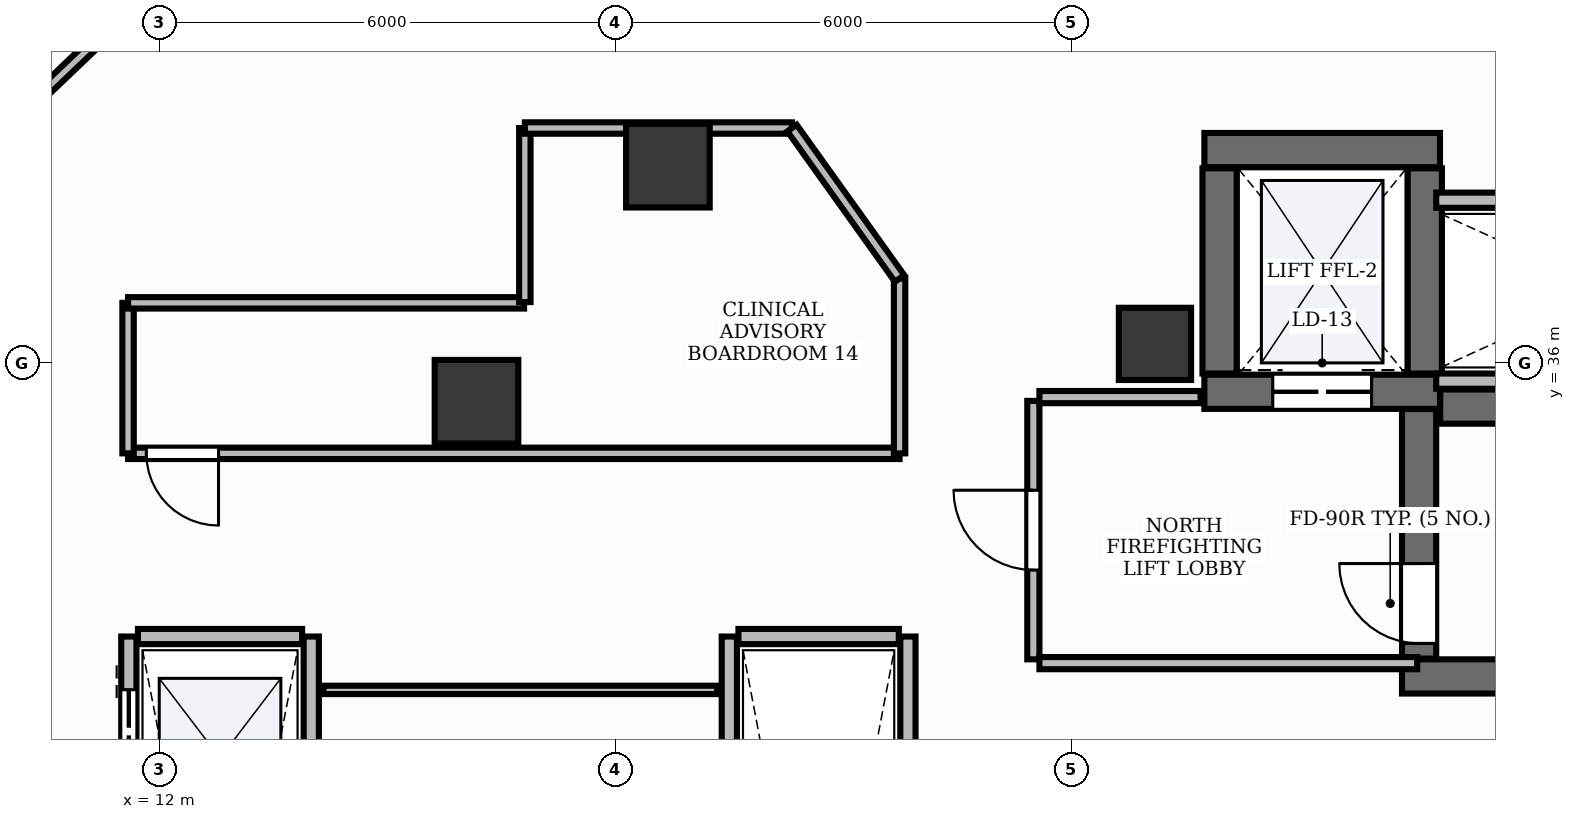
"""IFC4 building model, lengths in metres.
Left out: names, types, materials, properties, quantities, classifications, styles, units other than length and angle.
Written with IfcOpenShell. Run it as: python <this file> out.ifc"""

import sys

from ifc_helpers import new_model, si_unit, direction, frame, frame_2d, origin, origin_2d, place, context, subcontext, project, spatial, rectangle, extrude, element, fill, save


model = new_model("IFC4")
c1 = context("Model", 3, precision=1e-05, world=origin(), true_north=direction((0.0, 1.0)))
c2 = subcontext(c1, "Body", "Model", "MODEL_VIEW")
j1 = project(units=[si_unit("LENGTHUNIT", "METRE"), si_unit("PLANEANGLEUNIT", "RADIAN")], contexts=[c1])
p1 = place(None, origin())
s1 = spatial("IfcSite", under=j1, at=p1, CompositionType="ELEMENT")
p2 = place(p1, origin())
s2 = spatial("IfcBuilding", under=s1, at=p2, CompositionType="ELEMENT")
p3 = place(p2, frame((0.0, 0.0, 42.6)))
s3 = spatial("IfcBuildingStorey", under=s2, at=p3, CompositionType="ELEMENT", Elevation=42.6)
p4 = place(p3, frame((28.852, 35.425, 0.0), z_axis=(0.0, 0.0, 1.0), x_axis=(1.0, 0.0, 0.0)))
e1 = element("IfcWall", 1, at=p4, inside=s3, PredefinedType="SHEAR", context=c2, shape_type="SweptSolid", body=[
    extrude(rectangle(XDim=8.248, YDim=0.45, at=frame_2d((4.124, 0.0))), origin(), (0.0, 0.0, 1.0), 3.9),
])
p5 = place(p3, frame((28.35, 31.875, 0.0), z_axis=(0.0, 0.0, 1.0), x_axis=(1.0, 0.0, 0.0)))
e2 = element("IfcWall", 2, at=p5, inside=s3, PredefinedType="SHEAR", context=c2, shape_type="SweptSolid", body=[
    extrude(rectangle(XDim=8.75, YDim=0.45, at=frame_2d((4.375, 0.0))), origin(), (0.0, 0.0, 1.0), 3.9),
])
p6 = place(p3, frame((28.575, 32.11, 0.0), z_axis=(0.0, 0.0, 1.0), x_axis=(0.0, 1.0, 0.0)))
e3 = element("IfcWall", 3, at=p6, inside=s3, PredefinedType="SHEAR", context=c2, shape_type="SweptSolid", body=[
    extrude(rectangle(XDim=3.283, YDim=0.45, at=frame_2d((1.642, 0.0))), origin(), (0.0, 0.0, 1.0), 3.9),
])
p7 = place(p6, frame((0.2, 0.0, 0.0)))
e4 = element("IfcOpeningElement", 4, at=p7, cuts=e3, PredefinedType="OPENING", context=c2, shape_type="SweptSolid", body=[
    extrude(rectangle(XDim=1.05, YDim=2.15, at=frame_2d((0.525, 1.075))), frame((0.0, 0.24, 0.0), z_axis=(0.0, -1.0, 0.0), x_axis=(1.0, 0.0, 0.0)), (0.0, 0.0, 1.0), 0.48),
])
p8 = place(p3, frame((25.75, 38.8, 0.0), z_axis=(0.0, 0.0, 1.0), x_axis=(1.0, 0.0, 0.0)))
e5 = element("IfcWall", 5, at=p8, inside=s3, PredefinedType="SHEAR", context=c2, shape_type="SweptSolid", body=[
    extrude(rectangle(XDim=3.1, YDim=0.45, at=frame_2d((1.55, 0.0))), origin(), (0.0, 0.0, 1.0), 3.9),
])
p9 = place(p3, frame((25.75, 35.62, 0.0), z_axis=(0.0, 0.0, 1.0), x_axis=(1.0, 0.0, 0.0)))
e6 = element("IfcWall", 6, at=p9, inside=s3, PredefinedType="SHEAR", context=c2, shape_type="SweptSolid", body=[
    extrude(rectangle(XDim=3.1, YDim=0.45, at=frame_2d((1.55, 0.0))), origin(), (0.0, 0.0, 1.0), 3.9),
])
p10 = place(p9, frame((0.9, 0.0, 0.0)))
e7 = element("IfcOpeningElement", 7, at=p10, cuts=e6, PredefinedType="OPENING", context=c2, shape_type="SweptSolid", body=[
    extrude(rectangle(XDim=1.3, YDim=2.2, at=frame_2d((0.65, 1.1))), frame((0.0, 0.24, 0.0), z_axis=(0.0, -1.0, 0.0), x_axis=(1.0, 0.0, 0.0)), (0.0, 0.0, 1.0), 0.48),
])
for number, where, z_axis, x_axis in (
    (8, (25.95, 35.86, 0.0), (0.0, 0.0, 1.0), (0.0, 1.0, 0.0)),
    (9, (28.65, 35.86, 0.0), (0.0, 0.0, 1.0), (0.0, 1.0, 0.0)),
):
    element("IfcWall", number, at=place(p3, frame(where, z_axis=z_axis, x_axis=x_axis)), inside=s3, PredefinedType="SHEAR", context=c2, shape_type="SweptSolid", body=[
        extrude(rectangle(XDim=2.7, YDim=0.45, at=frame_2d((1.35, 0.0))), origin(), (0.0, 0.0, 1.0), 3.9),
    ])
p11 = place(p3, frame((25.1, 36.25, -0.0), z_axis=(0.0, 0.0, 1.0), x_axis=(1.0, 0.0, 0.0)))
e10 = element("IfcColumn", 10, at=p11, inside=s3, PredefinedType="PILASTER", context=c2, shape_type="SweptSolid", body=[
    extrude(rectangle(XDim=0.95, YDim=0.95, at=origin_2d()), origin(), (0.0, 0.0, 1.0), 3.901),
])
for number, where, z_axis, x_axis in (
    (11, (18.692, 38.595, -0.0), (0.0, 0.0, 1.0), (1.0, 0.0, 0.0)),
    (12, (16.174, 35.489, -0.0), (0.0, 0.0, 1.0), (1.0, 0.0, 0.0)),
):
    element("IfcColumn", number, at=place(p3, frame(where, z_axis=z_axis, x_axis=x_axis)), inside=s3, PredefinedType="COLUMN", context=c2, shape_type="SweptSolid", body=[
        extrude(rectangle(XDim=1.1, YDim=1.1, at=origin_2d()), origin(), (0.0, 0.0, 1.0), 3.901),
    ])
p12 = place(p3, frame((11.6, 21.6, 0.0), z_axis=(0.0, 0.0, 1.0), x_axis=(0.0, 1.0, 0.0)))
e13 = element("IfcWall", 13, at=p12, inside=s3, PredefinedType="PARTITIONING", context=c2, shape_type="SweptSolid", body=[
    extrude(rectangle(XDim=10.8, YDim=0.2, at=frame_2d((5.4, 0.0))), origin(), (0.0, 0.0, 1.0), 2.91),
])
p13 = place(p12, frame((0.9, 0.0, 0.0)))
e14 = element("IfcOpeningElement", 14, at=p13, cuts=e13, PredefinedType="OPENING", context=c2, shape_type="SweptSolid", body=[
    extrude(rectangle(XDim=1.1, YDim=2.2, at=frame_2d((0.55, 1.1))), frame((0.0, 0.115, 0.0), z_axis=(0.0, -1.0, 0.0), x_axis=(1.0, 0.0, 0.0)), (0.0, 0.0, 1.0), 0.23),
])
p14 = place(p12, frame((3.6, 0.0, 0.0)))
e15 = element("IfcOpeningElement", 15, at=p14, cuts=e13, PredefinedType="OPENING", context=c2, shape_type="SweptSolid", body=[
    extrude(rectangle(XDim=1.1, YDim=2.2, at=frame_2d((0.55, 1.1))), frame((0.0, 0.115, 0.0), z_axis=(0.0, -1.0, 0.0), x_axis=(1.0, 0.0, 0.0)), (0.0, 0.0, 1.0), 0.23),
])
p15 = place(p12, frame((6.3, 0.0, 0.0)))
e16 = element("IfcOpeningElement", 16, at=p15, cuts=e13, PredefinedType="OPENING", context=c2, shape_type="SweptSolid", body=[
    extrude(rectangle(XDim=1.1, YDim=2.2, at=frame_2d((0.55, 1.1))), frame((0.0, 0.115, 0.0), z_axis=(0.0, -1.0, 0.0), x_axis=(1.0, 0.0, 0.0)), (0.0, 0.0, 1.0), 0.23),
])
p16 = place(p12, frame((9.0, 0.0, 0.0)))
e17 = element("IfcOpeningElement", 17, at=p16, cuts=e13, PredefinedType="OPENING", context=c2, shape_type="SweptSolid", body=[
    extrude(rectangle(XDim=1.1, YDim=2.2, at=frame_2d((0.55, 1.1))), frame((0.0, 0.115, 0.0), z_axis=(0.0, -1.0, 0.0), x_axis=(1.0, 0.0, 0.0)), (0.0, 0.0, 1.0), 0.23),
])
p17 = place(p3, frame((14.0, 21.6, 0.0), z_axis=(0.0, 0.0, 1.0), x_axis=(0.0, 1.0, 0.0)))
e18 = element("IfcWall", 18, at=p17, inside=s3, PredefinedType="PARTITIONING", context=c2, shape_type="SweptSolid", body=[
    extrude(rectangle(XDim=10.8, YDim=0.2, at=frame_2d((5.4, 0.0))), origin(), (0.0, 0.0, 1.0), 2.91),
])
p18 = place(p3, frame((11.72, 32.4, 0.0), z_axis=(0.0, 0.0, 1.0), x_axis=(1.0, 0.0, 0.0)))
e19 = element("IfcWall", 19, at=p18, inside=s3, PredefinedType="PARTITIONING", context=c2, shape_type="SweptSolid", body=[
    extrude(rectangle(XDim=2.16, YDim=0.2, at=frame_2d((1.08, 0.0))), origin(), (0.0, 0.0, 1.0), 2.91),
])
for number, where, z_axis, x_axis in (
    (20, (19.5, 21.6, 0.0), (0.0, 0.0, 1.0), (0.0, 1.0, 0.0)),
    (21, (21.85, 21.6, 0.0), (0.0, 0.0, 1.0), (0.0, 1.0, 0.0)),
):
    element("IfcWall", number, at=place(p3, frame(where, z_axis=z_axis, x_axis=x_axis)), inside=s3, PredefinedType="PARTITIONING", context=c2, shape_type="SweptSolid", body=[
        extrude(rectangle(XDim=10.8, YDim=0.2, at=frame_2d((5.4, 0.0))), origin(), (0.0, 0.0, 1.0), 2.91),
    ])
p19 = place(p3, frame((19.62, 32.4, 0.0), z_axis=(0.0, 0.0, 1.0), x_axis=(1.0, 0.0, 0.0)))
e22 = element("IfcWall", 22, at=p19, inside=s3, PredefinedType="PARTITIONING", context=c2, shape_type="SweptSolid", body=[
    extrude(rectangle(XDim=2.11, YDim=0.2, at=frame_2d((1.055, 0.0))), origin(), (0.0, 0.0, 1.0), 2.91),
])
for number, where, z_axis, x_axis in (
    (23, (28.8, 35.76, 0.0), (0.0, 0.0, 1.0), (1.0, 0.0, 0.0)),
    (24, (28.8, 38.14, 0.0), (0.0, 0.0, 1.0), (1.0, 0.0, 0.0)),
):
    element("IfcWall", number, at=place(p3, frame(where, z_axis=z_axis, x_axis=x_axis)), inside=s3, PredefinedType="PARTITIONING", context=c2, shape_type="SweptSolid", body=[
        extrude(rectangle(XDim=4.57, YDim=0.2, at=frame_2d((2.285, 0.0))), origin(), (0.0, 0.0, 1.0), 2.91),
    ])
p20 = place(p3, frame((23.5, 32.1, 0.0), z_axis=(0.0, 0.0, 1.0), x_axis=(0.0, 1.0, 0.0)))
e25 = element("IfcWall", 25, at=p20, inside=s3, PredefinedType="PARTITIONING", context=c2, shape_type="SweptSolid", body=[
    extrude(rectangle(XDim=3.4, YDim=0.16, at=frame_2d((1.7, 0.0))), origin(), (0.0, 0.0, 1.0), 2.91),
])
p21 = place(p20, frame((1.175, 0.0, 0.0)))
e26 = element("IfcOpeningElement", 26, at=p21, cuts=e25, PredefinedType="OPENING", context=c2, shape_type="SweptSolid", body=[
    extrude(rectangle(XDim=1.05, YDim=2.15, at=frame_2d((0.525, 1.075))), frame((0.0, 0.095, 0.0), z_axis=(0.0, -1.0, 0.0), x_axis=(1.0, 0.0, 0.0)), (0.0, 0.0, 1.0), 0.19),
])
p22 = place(p3, frame((23.58, 32.05, 0.0), z_axis=(0.0, 0.0, 1.0), x_axis=(1.0, 0.0, 0.0)))
e27 = element("IfcWall", 27, at=p22, inside=s3, PredefinedType="PARTITIONING", context=c2, shape_type="SweptSolid", body=[
    extrude(rectangle(XDim=4.97, YDim=0.16, at=frame_2d((2.485, 0.0))), origin(), (0.0, 0.0, 1.0), 2.91),
])
p23 = place(p3, frame((23.58, 35.55, 0.0), z_axis=(0.0, 0.0, 1.0), x_axis=(1.0, 0.0, 0.0)))
e28 = element("IfcWall", 28, at=p23, inside=s3, PredefinedType="PARTITIONING", context=c2, shape_type="SweptSolid", body=[
    extrude(rectangle(XDim=2.12, YDim=0.16, at=frame_2d((1.06, 0.0))), origin(), (0.0, 0.0, 1.0), 2.91),
])
p24 = place(p3, frame((21.74, 34.81, 0.0), z_axis=(0.0, 0.0, 1.0), x_axis=(-1.0, 0.0, 0.0)))
e29 = element("IfcWall", 29, at=p24, inside=s3, PredefinedType="PARTITIONING", context=c2, shape_type="SweptSolid", body=[
    extrude(rectangle(XDim=10.15, YDim=0.15, at=frame_2d((5.075, 0.0))), origin(), (0.0, 0.0, 1.0), 2.91),
])
p25 = place(p24, frame((8.96, 0.0, 0.0)))
e30 = element("IfcOpeningElement", 30, at=p25, cuts=e29, PredefinedType="OPENING", context=c2, shape_type="SweptSolid", body=[
    extrude(rectangle(XDim=0.95, YDim=2.15, at=frame_2d((0.475, 1.075))), frame((0.0, 0.09, 0.0), z_axis=(0.0, -1.0, 0.0), x_axis=(1.0, 0.0, 0.0)), (0.0, 0.0, 1.0), 0.18),
])
p26 = place(p3, frame((14.16, 31.698, 0.0), z_axis=(0.0, 0.0, 1.0), x_axis=(1.0, 0.0, 0.0)))
e31 = element("IfcWall", 31, at=p26, inside=s3, PredefinedType="MOVABLE", context=c2, shape_type="SweptSolid", body=[
    extrude(rectangle(XDim=5.18, YDim=0.11, at=frame_2d((2.59, 0.0))), origin(), (0.0, 0.0, 1.0), 2.91),
])
p27 = place(p3, frame((21.74, 37.111, 0.0), z_axis=(0.0, 0.0, 1.0), x_axis=(0.0, -1.0, 0.0)))
e32 = element("IfcWall", 32, at=p27, inside=s3, PredefinedType="PARTITIONING", context=c2, shape_type="SweptSolid", body=[
    extrude(rectangle(XDim=2.301, YDim=0.15, at=frame_2d((1.15, 0.0))), origin(), (0.0, 0.0, 1.0), 2.91),
])
p28 = place(p3, frame((11.59, 34.81, 0.0), z_axis=(0.0, 0.0, 1.0), x_axis=(0.0, 1.0, 0.0)))
e33 = element("IfcWall", 33, at=p28, inside=s3, PredefinedType="PARTITIONING", context=c2, shape_type="SweptSolid", body=[
    extrude(rectangle(XDim=1.98, YDim=0.15, at=frame_2d((0.99, 0.0))), origin(), (0.0, 0.0, 1.0), 2.91),
])
p29 = place(p3, frame((11.59, 36.79, 0.0), z_axis=(0.0, 0.0, 1.0), x_axis=(1.0, 0.0, 0.0)))
e34 = element("IfcWall", 34, at=p29, inside=s3, PredefinedType="PARTITIONING", context=c2, shape_type="SweptSolid", body=[
    extrude(rectangle(XDim=5.21, YDim=0.15, at=frame_2d((2.605, 0.0))), origin(), (0.0, 0.0, 1.0), 2.91),
])
p30 = place(p3, frame((16.81, 36.8, 0.0), z_axis=(0.0, 0.0, 1.0), x_axis=(0.0, 1.0, 0.0)))
e35 = element("IfcWall", 35, at=p30, inside=s3, PredefinedType="PARTITIONING", context=c2, shape_type="SweptSolid", body=[
    extrude(rectangle(XDim=2.29, YDim=0.15, at=frame_2d((1.145, 0.0))), origin(), (0.0, 0.0, 1.0), 2.91),
])
p31 = place(p3, frame((16.81, 39.09, 0.0), z_axis=(0.0, 0.0, 1.0), x_axis=(1.0, 0.0, 0.0)))
e36 = element("IfcWall", 36, at=p31, inside=s3, PredefinedType="PARTITIONING", context=c2, shape_type="SweptSolid", body=[
    extrude(rectangle(XDim=3.515, YDim=0.15, at=frame_2d((1.757, 0.0))), origin(), (0.0, 0.0, 1.0), 2.91),
])
p32 = place(p3, frame((20.325, 39.09, 0.0), z_axis=(0.0, 0.0, 1.0), x_axis=(0.581703214005, -0.813401113115, 0.0)))
e37 = element("IfcWall", 37, at=p32, inside=s3, PredefinedType="PARTITIONING", context=c2, shape_type="SweptSolid", body=[
    extrude(rectangle(XDim=2.433, YDim=0.15, at=frame_2d((1.217, 0.0))), origin(), (0.0, 0.0, 1.0), 2.91),
])
p33 = place(p3, frame((11.307, 40.358, 0.0), z_axis=(0.0, 0.0, 1.0), x_axis=(-0.723655021688, -0.690161872017, 0.0)))
e38 = element("IfcWall", 38, at=p33, inside=s3, PredefinedType="PARTITIONING", context=c2, shape_type="SweptSolid", body=[
    extrude(rectangle(XDim=2.406, YDim=0.15, at=frame_2d((1.203, 0.0))), origin(), (0.0, 0.0, 1.0), 2.91),
])
p34 = place(p7, origin())
e39 = element("IfcDoor", 39, at=p34, inside=s3, OperationType="SINGLE_SWING_RIGHT", PredefinedType="DOOR", context=c2, shape_type="SweptSolid", body=[
    extrude(rectangle(XDim=1.05, YDim=2.15, at=frame_2d((0.525, 1.075))), frame((0.0, 0.025, 0.0), z_axis=(0.0, -1.0, 0.0), x_axis=(1.0, 0.0, 0.0)), (0.0, 0.0, 1.0), 0.05),
])
fill(e4, e39)
p35 = place(p16, origin())
e40 = element("IfcDoor", 40, at=p35, inside=s3, OperationType="DOUBLE_DOOR_SLIDING", PredefinedType="DOOR", context=c2, shape_type="SweptSolid", body=[
    extrude(rectangle(XDim=1.1, YDim=2.2, at=frame_2d((0.55, 1.1))), frame((0.0, 0.025, 0.0), z_axis=(0.0, -1.0, 0.0), x_axis=(1.0, 0.0, 0.0)), (0.0, 0.0, 1.0), 0.05),
])
fill(e17, e40)
p36 = place(p10, origin())
e41 = element("IfcDoor", 41, at=p36, inside=s3, OperationType="DOUBLE_DOOR_SLIDING", PredefinedType="DOOR", context=c2, shape_type="SweptSolid", body=[
    extrude(rectangle(XDim=1.3, YDim=2.2, at=frame_2d((0.65, 1.1))), frame((0.0, 0.025, 0.0), z_axis=(0.0, -1.0, 0.0), x_axis=(1.0, 0.0, 0.0)), (0.0, 0.0, 1.0), 0.05),
])
fill(e7, e41)
p37 = place(p21, origin())
e42 = element("IfcDoor", 42, at=p37, inside=s3, OperationType="SINGLE_SWING_RIGHT", PredefinedType="DOOR", context=c2, shape_type="SweptSolid", body=[
    extrude(rectangle(XDim=1.05, YDim=2.15, at=frame_2d((0.525, 1.075))), frame((0.0, 0.025, 0.0), z_axis=(0.0, -1.0, 0.0), x_axis=(1.0, 0.0, 0.0)), (0.0, 0.0, 1.0), 0.05),
])
fill(e26, e42)
p38 = place(p25, origin())
e43 = element("IfcDoor", 43, at=p38, inside=s3, OperationType="SINGLE_SWING_LEFT", PredefinedType="DOOR", context=c2, shape_type="SweptSolid", body=[
    extrude(rectangle(XDim=0.95, YDim=2.15, at=frame_2d((0.475, 1.075))), frame((0.0, 0.025, 0.0), z_axis=(0.0, -1.0, 0.0), x_axis=(1.0, 0.0, 0.0)), (0.0, 0.0, 1.0), 0.05),
])
fill(e30, e43)
save(model, sys.argv[1])
